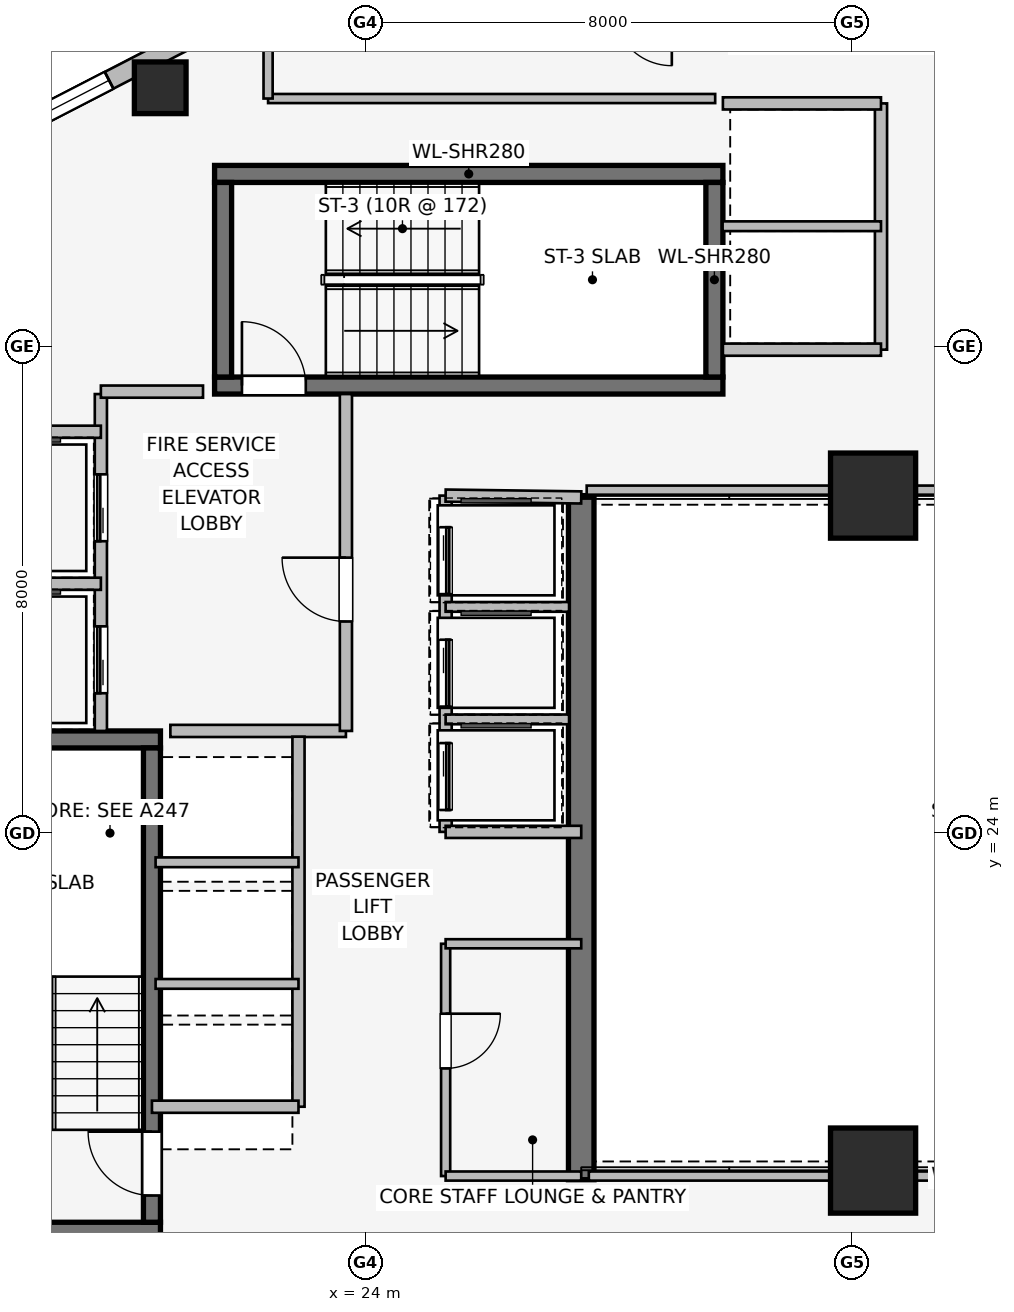
"""IFC4 building model, lengths in metres.
Left out: names, types, materials, properties, quantities, classifications, styles, units other than length and angle.
Written with IfcOpenShell. Run it as: python <this file> out.ifc"""

import sys

from ifc_helpers import new_model, si_unit, direction, frame, frame_2d, origin, origin_2d, place, context, subcontext, project, spatial, rectangle, extrude, element, fill, save


model = new_model("IFC4")
c1 = context("Model", 3, precision=1e-05, world=origin(), true_north=direction((0.0, 1.0)))
c2 = subcontext(c1, "Body", "Model", "MODEL_VIEW")
j1 = project(units=[si_unit("LENGTHUNIT", "METRE"), si_unit("PLANEANGLEUNIT", "RADIAN")], contexts=[c1])
p1 = place(None, origin())
s1 = spatial("IfcSite", under=j1, at=p1, CompositionType="ELEMENT")
p2 = place(p1, origin())
s2 = spatial("IfcBuilding", under=s1, at=p2, CompositionType="ELEMENT")
p3 = place(p2, frame((0.0, 0.0, 167.1)))
s3 = spatial("IfcBuildingStorey", under=s2, at=p3, CompositionType="ELEMENT", Elevation=167.1)
p4 = place(p3, frame((27.55, 29.55, 0.0), z_axis=(0.0, 0.0, 1.0), x_axis=(0.0, -1.0, 0.0)))
e1 = element("IfcWall", 1, at=p4, inside=s3, PredefinedType="SHEAR", context=c2, shape_type="SweptSolid", body=[
    extrude(rectangle(XDim=11.25, YDim=0.42, at=frame_2d((5.625, 0.0))), origin(), (0.0, 0.0, 1.0), 3.45),
])
for number, where, z_axis, x_axis in (
    (2, (16.87, 17.46, 0.0), (0.0, 0.0, 1.0), (1.0, 0.0, 0.0)),
    (3, (20.63, 25.54, 0.0), (0.0, 0.0, 1.0), (-1.0, 0.0, 0.0)),
):
    element("IfcWall", number, at=place(p3, frame(where, z_axis=z_axis, x_axis=x_axis)), inside=s3, PredefinedType="SHEAR", context=c2, shape_type="SweptSolid", body=[
        extrude(rectangle(XDim=3.76, YDim=0.28, at=frame_2d((1.88, 0.0))), origin(), (0.0, 0.0, 1.0), 3.45),
    ])
p5 = place(p3, frame((20.49, 17.6, 0.0), z_axis=(0.0, 0.0, 1.0), x_axis=(0.0, 1.0, 0.0)))
e4 = element("IfcWall", 4, at=p5, inside=s3, PredefinedType="SHEAR", context=c2, shape_type="SweptSolid", body=[
    extrude(rectangle(XDim=7.8, YDim=0.28, at=frame_2d((3.9, 0.0))), origin(), (0.0, 0.0, 1.0), 3.45),
])
p6 = place(p5, frame((0.44, 0.0, 0.0)))
e5 = element("IfcOpeningElement", 5, at=p6, cuts=e4, PredefinedType="OPENING", context=c2, shape_type="SweptSolid", body=[
    extrude(rectangle(XDim=1.05, YDim=2.0, at=frame_2d((0.525, 1.0))), frame((0.0, 0.15, 0.0), z_axis=(0.0, -1.0, 0.0), x_axis=(1.0, 0.0, 0.0)), (0.0, 0.0, 1.0), 0.3),
])
p7 = place(p3, frame((21.52, 31.36, 0.0), z_axis=(0.0, 0.0, 1.0), x_axis=(1.0, 0.0, 0.0)))
e6 = element("IfcWall", 6, at=p7, inside=s3, PredefinedType="SHEAR", context=c2, shape_type="SweptSolid", body=[
    extrude(rectangle(XDim=8.36, YDim=0.28, at=frame_2d((4.18, 0.0))), origin(), (0.0, 0.0, 1.0), 3.45),
])
p8 = place(p7, frame((0.45, 0.0, 0.0)))
e7 = element("IfcOpeningElement", 7, at=p8, cuts=e6, PredefinedType="OPENING", context=c2, shape_type="SweptSolid", body=[
    extrude(rectangle(XDim=1.05, YDim=2.0, at=frame_2d((0.525, 1.0))), frame((0.0, 0.15, 0.0), z_axis=(0.0, -1.0, 0.0), x_axis=(1.0, 0.0, 0.0)), (0.0, 0.0, 1.0), 0.3),
])
p9 = place(p3, frame((29.88, 34.84, 0.0), z_axis=(0.0, 0.0, 1.0), x_axis=(-1.0, 0.0, 0.0)))
e8 = element("IfcWall", 8, at=p9, inside=s3, PredefinedType="SHEAR", context=c2, shape_type="SweptSolid", body=[
    extrude(rectangle(XDim=8.36, YDim=0.28, at=frame_2d((4.18, 0.0))), origin(), (0.0, 0.0, 1.0), 3.45),
])
for number, where, z_axis, x_axis in (
    (9, (21.66, 34.7, 0.0), (0.0, 0.0, 1.0), (0.0, -1.0, 0.0)),
    (10, (29.74, 31.5, 0.0), (0.0, 0.0, 1.0), (0.0, 1.0, 0.0)),
):
    element("IfcWall", number, at=place(p3, frame(where, z_axis=z_axis, x_axis=x_axis)), inside=s3, PredefinedType="SHEAR", context=c2, shape_type="SweptSolid", body=[
        extrude(rectangle(XDim=3.2, YDim=0.28, at=frame_2d((1.6, 0.0))), origin(), (0.0, 0.0, 1.0), 3.45),
    ])
for number, where, z_axis, x_axis in (
    (11, (32.35, 18.45, 0.0), (0.0, 0.0, 1.0), (1.0, 0.0, 0.0)),
    (12, (32.35, 29.55, 0.0), (0.0, 0.0, 1.0), (1.0, 0.0, 0.0)),
):
    element("IfcColumn", number, at=place(p3, frame(where, z_axis=z_axis, x_axis=x_axis)), inside=s3, PredefinedType="COLUMN", context=c2, shape_type="SweptSolid", body=[
        extrude(rectangle(XDim=1.4, YDim=1.4, at=origin_2d()), origin(), (0.0, 0.0, 1.0), 3.45),
    ])
p10 = place(p3, frame((20.626, 36.257, 0.0), z_axis=(0.0, 0.0, 1.0), x_axis=(1.0, 0.0, 0.0)))
e13 = element("IfcColumn", 13, at=p10, inside=s3, PredefinedType="COLUMN", context=c2, shape_type="SweptSolid", body=[
    extrude(rectangle(XDim=0.85, YDim=0.85, at=origin_2d()), origin(), (0.0, 0.0, 1.0), 3.45),
])
p11 = place(p3, frame((17.408, 35.153, 0.0), z_axis=(0.0, 0.0, 1.0), x_axis=(0.888626188278, 0.458632202867, 0.0)))
e14 = element("IfcWall", 14, at=p11, inside=s3, PredefinedType="STANDARD", context=c2, shape_type="SweptSolid", body=[
    extrude(rectangle(XDim=16.828, YDim=0.31, at=frame_2d((8.414, 0.0))), origin(), (0.0, 0.0, 1.0), 3.19),
])
p12 = place(p11, frame((0.675, 0.0, 0.75)))
e15 = element("IfcOpeningElement", 15, at=p12, cuts=e14, PredefinedType="OPENING", context=c2, shape_type="SweptSolid", body=[
    extrude(rectangle(XDim=2.0, YDim=1.5, at=frame_2d((1.0, 0.75))), frame((0.0, 0.165, 0.0), z_axis=(0.0, -1.0, 0.0), x_axis=(1.0, 0.0, 0.0)), (0.0, 0.0, 1.0), 0.33),
])
p13 = place(p11, frame((6.312, 0.0, 0.75)))
e16 = element("IfcOpeningElement", 16, at=p13, cuts=e14, PredefinedType="OPENING", context=c2, shape_type="SweptSolid", body=[
    extrude(rectangle(XDim=1.35, YDim=1.45, at=frame_2d((0.675, 0.725))), frame((0.0, 0.165, 0.0), z_axis=(0.0, -1.0, 0.0), x_axis=(1.0, 0.0, 0.0)), (0.0, 0.0, 1.0), 0.33),
])
p14 = place(p11, frame((8.676, 0.0, 0.75)))
e17 = element("IfcOpeningElement", 17, at=p14, cuts=e14, PredefinedType="OPENING", context=c2, shape_type="SweptSolid", body=[
    extrude(rectangle(XDim=1.35, YDim=1.45, at=frame_2d((0.675, 0.725))), frame((0.0, 0.165, 0.0), z_axis=(0.0, -1.0, 0.0), x_axis=(1.0, 0.0, 0.0)), (0.0, 0.0, 1.0), 0.33),
])
p15 = place(p11, frame((11.041, 0.0, 0.75)))
e18 = element("IfcOpeningElement", 18, at=p15, cuts=e14, PredefinedType="OPENING", context=c2, shape_type="SweptSolid", body=[
    extrude(rectangle(XDim=1.35, YDim=1.45, at=frame_2d((0.675, 0.725))), frame((0.0, 0.165, 0.0), z_axis=(0.0, -1.0, 0.0), x_axis=(1.0, 0.0, 0.0)), (0.0, 0.0, 1.0), 0.33),
])
p16 = place(p11, frame((14.153, 0.0, 0.75)))
e19 = element("IfcOpeningElement", 19, at=p16, cuts=e14, PredefinedType="OPENING", context=c2, shape_type="SweptSolid", body=[
    extrude(rectangle(XDim=2.0, YDim=1.5, at=frame_2d((1.0, 0.75))), frame((0.0, 0.165, 0.0), z_axis=(0.0, -1.0, 0.0), x_axis=(1.0, 0.0, 0.0)), (0.0, 0.0, 1.0), 0.33),
])
p17 = place(p3, frame((19.65, 25.68, 0.0), z_axis=(0.0, 0.0, 1.0), x_axis=(0.0, 1.0, 0.0)))
e20 = element("IfcWall", 20, at=p17, inside=s3, PredefinedType="PARTITIONING", context=c2, shape_type="SweptSolid", body=[
    extrude(rectangle(XDim=5.54, YDim=0.2, at=frame_2d((2.77, 0.0))), origin(), (0.0, 0.0, 1.0), 3.19),
])
p18 = place(p17, frame((0.62, 0.0, 0.0)))
e21 = element("IfcOpeningElement", 21, at=p18, cuts=e20, PredefinedType="OPENING", context=c2, shape_type="SweptSolid", body=[
    extrude(rectangle(XDim=1.1, YDim=2.2, at=frame_2d((0.55, 1.1))), frame((0.0, 0.11, 0.0), z_axis=(0.0, -1.0, 0.0), x_axis=(1.0, 0.0, 0.0)), (0.0, 0.0, 1.0), 0.22),
])
p19 = place(p17, frame((3.12, 0.0, 0.0)))
e22 = element("IfcOpeningElement", 22, at=p19, cuts=e20, PredefinedType="OPENING", context=c2, shape_type="SweptSolid", body=[
    extrude(rectangle(XDim=1.1, YDim=2.2, at=frame_2d((0.55, 1.1))), frame((0.0, 0.11, 0.0), z_axis=(0.0, -1.0, 0.0), x_axis=(1.0, 0.0, 0.0)), (0.0, 0.0, 1.0), 0.22),
])
p20 = place(p3, frame((20.793, 25.68, 0.0), z_axis=(0.0, 0.0, 1.0), x_axis=(1.0, 0.0, 0.0)))
e23 = element("IfcWall", 23, at=p20, inside=s3, PredefinedType="PARTITIONING", context=c2, shape_type="SweptSolid", body=[
    extrude(rectangle(XDim=2.887, YDim=0.2, at=frame_2d((1.443, 0.0))), origin(), (0.0, 0.0, 1.0), 3.19),
])
p21 = place(p3, frame((23.68, 25.68, 0.0), z_axis=(0.0, 0.0, 1.0), x_axis=(0.0, 1.0, 0.0)))
e24 = element("IfcWall", 24, at=p21, inside=s3, PredefinedType="PARTITIONING", context=c2, shape_type="SweptSolid", body=[
    extrude(rectangle(XDim=5.54, YDim=0.2, at=frame_2d((2.77, 0.0))), origin(), (0.0, 0.0, 1.0), 3.19),
])
p22 = place(p21, frame((1.8, 0.0, 0.0)))
e25 = element("IfcOpeningElement", 25, at=p22, cuts=e24, PredefinedType="OPENING", context=c2, shape_type="SweptSolid", body=[
    extrude(rectangle(XDim=1.05, YDim=2.0, at=frame_2d((0.525, 1.0))), frame((0.0, 0.11, 0.0), z_axis=(0.0, -1.0, 0.0), x_axis=(1.0, 0.0, 0.0)), (0.0, 0.0, 1.0), 0.22),
])
p23 = place(p3, frame((21.33, 31.26, 0.0), z_axis=(0.0, 0.0, 1.0), x_axis=(-1.0, 0.0, 0.0)))
e26 = element("IfcWall", 26, at=p23, inside=s3, PredefinedType="PARTITIONING", context=c2, shape_type="SweptSolid", body=[
    extrude(rectangle(XDim=1.68, YDim=0.2, at=frame_2d((0.84, 0.0))), origin(), (0.0, 0.0, 1.0), 3.19),
])
p24 = place(p3, frame((17.15, 28.1, 0.0), z_axis=(0.0, 0.0, 1.0), x_axis=(1.0, 0.0, 0.0)))
e27 = element("IfcWall", 27, at=p24, inside=s3, PredefinedType="PARTITIONING", context=c2, shape_type="SweptSolid", body=[
    extrude(rectangle(XDim=2.5, YDim=0.2, at=frame_2d((1.25, 0.0))), origin(), (0.0, 0.0, 1.0), 3.19),
])
p25 = place(p3, frame((19.65, 30.6, 0.0), z_axis=(0.0, 0.0, 1.0), x_axis=(-1.0, 0.0, 0.0)))
e28 = element("IfcWall", 28, at=p25, inside=s3, PredefinedType="PARTITIONING", context=c2, shape_type="SweptSolid", body=[
    extrude(rectangle(XDim=2.5, YDim=0.2, at=frame_2d((1.25, 0.0))), origin(), (0.0, 0.0, 1.0), 2.09),
])
p26 = place(p3, frame((32.48, 31.95, 0.0), z_axis=(0.0, 0.0, 1.0), x_axis=(0.0, 1.0, 0.0)))
e29 = element("IfcWall", 29, at=p26, inside=s3, PredefinedType="PARTITIONING", context=c2, shape_type="SweptSolid", body=[
    extrude(rectangle(XDim=4.05, YDim=0.2, at=frame_2d((2.025, 0.0))), origin(), (0.0, 0.0, 1.0), 3.19),
])
for number, where, z_axis, x_axis in (
    (30, (29.88, 36.0, 0.0), (0.0, 0.0, 1.0), (1.0, 0.0, 0.0)),
    (31, (32.48, 31.95, 0.0), (0.0, 0.0, 1.0), (-1.0, 0.0, 0.0)),
):
    element("IfcWall", number, at=place(p3, frame(where, z_axis=z_axis, x_axis=x_axis)), inside=s3, PredefinedType="PARTITIONING", context=c2, shape_type="SweptSolid", body=[
        extrude(rectangle(XDim=2.6, YDim=0.2, at=frame_2d((1.3, 0.0))), origin(), (0.0, 0.0, 1.0), 3.19),
    ])
p27 = place(p3, frame((29.875, 33.98, 0.0), z_axis=(0.0, 0.0, 1.0), x_axis=(1.0, 0.0, 0.0)))
e32 = element("IfcWall", 32, at=p27, inside=s3, PredefinedType="PARTITIONING", context=c2, shape_type="SweptSolid", body=[
    extrude(rectangle(XDim=2.605, YDim=0.16, at=frame_2d((1.302, 0.0))), origin(), (0.0, 0.0, 1.0), 2.582),
])
p28 = place(p3, frame((22.9, 19.5, 0.0), z_axis=(0.0, 0.0, 1.0), x_axis=(0.0, 1.0, 0.0)))
e33 = element("IfcWall", 33, at=p28, inside=s3, PredefinedType="PARTITIONING", context=c2, shape_type="SweptSolid", body=[
    extrude(rectangle(XDim=6.085, YDim=0.2, at=frame_2d((3.042, 0.0))), origin(), (0.0, 0.0, 1.0), 3.19),
])
p29 = place(p3, frame((20.49, 19.5, 0.0), z_axis=(0.0, 0.0, 1.0), x_axis=(1.0, 0.0, 0.0)))
e34 = element("IfcWall", 34, at=p29, inside=s3, PredefinedType="PARTITIONING", context=c2, shape_type="SweptSolid", body=[
    extrude(rectangle(XDim=2.41, YDim=0.2, at=frame_2d((1.205, 0.0))), origin(), (0.0, 0.0, 1.0), 2.09),
])
for number, where, z_axis, x_axis in (
    (35, (20.55, 21.52, 0.0), (0.0, 0.0, 1.0), (1.0, 0.0, 0.0)),
    (36, (20.55, 23.52, 0.0), (0.0, 0.0, 1.0), (1.0, 0.0, 0.0)),
):
    element("IfcWall", number, at=place(p3, frame(where, z_axis=z_axis, x_axis=x_axis)), inside=s3, PredefinedType="PARTITIONING", context=c2, shape_type="SweptSolid", body=[
        extrude(rectangle(XDim=2.35, YDim=0.16, at=frame_2d((1.175, 0.0))), origin(), (0.0, 0.0, 1.0), 3.19),
    ])
p30 = place(p3, frame((25.32, 29.55, 0.0), z_axis=(0.0, 0.0, 1.0), x_axis=(0.0, -1.0, 0.0)))
e37 = element("IfcWall", 37, at=p30, inside=s3, PredefinedType="PARTITIONING", context=c2, shape_type="SweptSolid", body=[
    extrude(rectangle(XDim=5.53, YDim=0.2, at=frame_2d((2.765, 0.0))), origin(), (0.0, 0.0, 1.0), 3.19),
])
p31 = place(p30, frame((0.52, 0.0, 0.0)))
e38 = element("IfcOpeningElement", 38, at=p31, cuts=e37, PredefinedType="OPENING", context=c2, shape_type="SweptSolid", body=[
    extrude(rectangle(XDim=1.1, YDim=2.2, at=frame_2d((0.55, 1.1))), frame((0.0, 0.11, 0.0), z_axis=(0.0, -1.0, 0.0), x_axis=(1.0, 0.0, 0.0)), (0.0, 0.0, 1.0), 0.22),
])
p32 = place(p30, frame((2.37, 0.0, 0.0)))
e39 = element("IfcOpeningElement", 39, at=p32, cuts=e37, PredefinedType="OPENING", context=c2, shape_type="SweptSolid", body=[
    extrude(rectangle(XDim=1.1, YDim=2.2, at=frame_2d((0.55, 1.1))), frame((0.0, 0.11, 0.0), z_axis=(0.0, -1.0, 0.0), x_axis=(1.0, 0.0, 0.0)), (0.0, 0.0, 1.0), 0.22),
])
p33 = place(p30, frame((4.07, 0.0, 0.0)))
e40 = element("IfcOpeningElement", 40, at=p33, cuts=e37, PredefinedType="OPENING", context=c2, shape_type="SweptSolid", body=[
    extrude(rectangle(XDim=1.1, YDim=2.2, at=frame_2d((0.55, 1.1))), frame((0.0, 0.11, 0.0), z_axis=(0.0, -1.0, 0.0), x_axis=(1.0, 0.0, 0.0)), (0.0, 0.0, 1.0), 0.22),
])
p34 = place(p3, frame((27.55, 29.52, 0.0), z_axis=(0.0, 0.0, 1.0), x_axis=(-0.999909343457, 0.013464949556, 0.0)))
e41 = element("IfcWall", 41, at=p34, inside=s3, PredefinedType="PARTITIONING", context=c2, shape_type="SweptSolid", body=[
    extrude(rectangle(XDim=2.23, YDim=0.2, at=frame_2d((1.115, 0.0))), origin(), (0.0, 0.0, 1.0), 2.09),
])
p35 = place(p3, frame((25.32, 24.02, 0.0), z_axis=(0.0, 0.0, 1.0), x_axis=(1.0, 0.0, 0.0)))
e42 = element("IfcWall", 42, at=p35, inside=s3, PredefinedType="PARTITIONING", context=c2, shape_type="SweptSolid", body=[
    extrude(rectangle(XDim=2.23, YDim=0.2, at=frame_2d((1.115, 0.0))), origin(), (0.0, 0.0, 1.0), 3.19),
])
for number, where, z_axis, x_axis in (
    (43, (25.32, 25.87, 0.0), (0.0, 0.0, 1.0), (1.0, 0.0, 0.0)),
    (44, (25.32, 27.72, 0.0), (0.0, 0.0, 1.0), (1.0, 0.0, 0.0)),
):
    element("IfcWall", number, at=place(p3, frame(where, z_axis=z_axis, x_axis=x_axis)), inside=s3, PredefinedType="PARTITIONING", context=c2, shape_type="SweptSolid", body=[
        extrude(rectangle(XDim=2.03, YDim=0.16, at=frame_2d((1.015, 0.0))), origin(), (0.0, 0.0, 1.0), 3.19),
    ])
p36 = place(p3, frame((25.32, 22.18, 0.0), z_axis=(0.0, 0.0, 1.0), x_axis=(0.0, -1.0, 0.0)))
e45 = element("IfcWall", 45, at=p36, inside=s3, PredefinedType="PARTITIONING", context=c2, shape_type="SweptSolid", body=[
    extrude(rectangle(XDim=3.82, YDim=0.15, at=frame_2d((1.91, 0.0))), origin(), (0.0, 0.0, 1.0), 3.19),
])
p37 = place(p36, frame((1.15, 0.0, 0.0)))
e46 = element("IfcOpeningElement", 46, at=p37, cuts=e45, PredefinedType="OPENING", context=c2, shape_type="SweptSolid", body=[
    extrude(rectangle(XDim=0.9, YDim=2.0, at=frame_2d((0.45, 1.0))), frame((0.0, 0.085, 0.0), z_axis=(0.0, -1.0, 0.0), x_axis=(1.0, 0.0, 0.0)), (0.0, 0.0, 1.0), 0.17),
])
for number, where, z_axis, x_axis in (
    (47, (25.32, 22.18, 0.0), (0.0, 0.0, 1.0), (1.0, 0.0, 0.0)),
    (48, (25.32, 18.36, 0.0), (0.0, 0.0, 1.0), (1.0, 0.0, 0.0)),
):
    element("IfcWall", number, at=place(p3, frame(where, z_axis=z_axis, x_axis=x_axis)), inside=s3, PredefinedType="PARTITIONING", context=c2, shape_type="SweptSolid", body=[
        extrude(rectangle(XDim=2.23, YDim=0.15, at=frame_2d((1.115, 0.0))), origin(), (0.0, 0.0, 1.0), 3.19),
    ])
p38 = place(p3, frame((27.675, 18.36, 0.0), z_axis=(0.0, 0.0, 1.0), x_axis=(1.0, 0.0, 0.0)))
e49 = element("IfcWall", 49, at=p38, inside=s3, PredefinedType="PARTITIONING", context=c2, shape_type="SweptSolid", body=[
    extrude(rectangle(XDim=12.165, YDim=0.15, at=frame_2d((6.083, 0.0))), origin(), (0.0, 0.0, 1.0), 2.331),
])
p39 = place(p3, frame((39.84, 29.64, 0.0), z_axis=(0.0, 0.0, 1.0), x_axis=(-1.0, 0.0, 0.0)))
e50 = element("IfcWall", 50, at=p39, inside=s3, PredefinedType="PARTITIONING", context=c2, shape_type="SweptSolid", body=[
    extrude(rectangle(XDim=12.2, YDim=0.15, at=frame_2d((6.1, 0.0))), origin(), (0.0, 0.0, 1.0), 2.331),
])
p40 = place(p3, frame((29.753, 36.08, 0.0), z_axis=(0.0, 0.0, 1.0), x_axis=(-1.0, 0.0, 0.0)))
e51 = element("IfcWall", 51, at=p40, inside=s3, PredefinedType="PARTITIONING", context=c2, shape_type="SweptSolid", body=[
    extrude(rectangle(XDim=7.353, YDim=0.15, at=frame_2d((3.677, 0.0))), origin(), (0.0, 0.0, 1.0), 3.19),
])
p41 = place(p3, frame((22.4, 36.08, 0.0), z_axis=(0.0, 0.0, 1.0), x_axis=(0.0, 1.0, 0.0)))
e52 = element("IfcWall", 52, at=p41, inside=s3, PredefinedType="PARTITIONING", context=c2, shape_type="SweptSolid", body=[
    extrude(rectangle(XDim=1.43, YDim=0.15, at=frame_2d((0.715, 0.0))), origin(), (0.0, 0.0, 1.0), 3.19),
])
p42 = place(p12, origin())
e53 = element("IfcWindow", 53, at=p42, inside=s3, PartitioningType="SINGLE_PANEL", PredefinedType="WINDOW", context=c2, shape_type="SweptSolid", body=[
    extrude(rectangle(XDim=2.0, YDim=1.5, at=frame_2d((1.0, 0.75))), frame((0.0, 0.03, 0.0), z_axis=(0.0, -1.0, 0.0), x_axis=(1.0, 0.0, 0.0)), (0.0, 0.0, 1.0), 0.06),
])
fill(e15, e53)
p43 = place(p6, origin())
e54 = element("IfcDoor", 54, at=p43, inside=s3, OperationType="SINGLE_SWING_RIGHT", PredefinedType="DOOR", context=c2, shape_type="SweptSolid", body=[
    extrude(rectangle(XDim=1.05, YDim=2.0, at=frame_2d((0.525, 1.0))), frame((0.0, 0.025, 0.0), z_axis=(0.0, -1.0, 0.0), x_axis=(1.0, 0.0, 0.0)), (0.0, 0.0, 1.0), 0.05),
])
fill(e5, e54)
p44 = place(p8, origin())
e55 = element("IfcDoor", 55, at=p44, inside=s3, OperationType="SINGLE_SWING_LEFT", PredefinedType="DOOR", context=c2, shape_type="SweptSolid", body=[
    extrude(rectangle(XDim=1.05, YDim=2.0, at=frame_2d((0.525, 1.0))), frame((0.0, 0.025, 0.0), z_axis=(0.0, -1.0, 0.0), x_axis=(1.0, 0.0, 0.0)), (0.0, 0.0, 1.0), 0.05),
])
fill(e7, e55)
p45 = place(p18, origin())
e56 = element("IfcDoor", 56, at=p45, inside=s3, OperationType="SLIDING_TO_LEFT", PredefinedType="DOOR", context=c2, shape_type="SweptSolid", body=[
    extrude(rectangle(XDim=1.1, YDim=2.2, at=frame_2d((0.55, 1.1))), frame((0.0, 0.025, 0.0), z_axis=(0.0, -1.0, 0.0), x_axis=(1.0, 0.0, 0.0)), (0.0, 0.0, 1.0), 0.05),
])
fill(e21, e56)
p46 = place(p19, origin())
e57 = element("IfcDoor", 57, at=p46, inside=s3, OperationType="SLIDING_TO_LEFT", PredefinedType="DOOR", context=c2, shape_type="SweptSolid", body=[
    extrude(rectangle(XDim=1.1, YDim=2.2, at=frame_2d((0.55, 1.1))), frame((0.0, 0.025, 0.0), z_axis=(0.0, -1.0, 0.0), x_axis=(1.0, 0.0, 0.0)), (0.0, 0.0, 1.0), 0.05),
])
fill(e22, e57)
p47 = place(p22, origin())
e58 = element("IfcDoor", 58, at=p47, inside=s3, OperationType="SINGLE_SWING_RIGHT", PredefinedType="DOOR", context=c2, shape_type="SweptSolid", body=[
    extrude(rectangle(XDim=1.05, YDim=2.0, at=frame_2d((0.525, 1.0))), frame((0.0, 0.025, 0.0), z_axis=(0.0, -1.0, 0.0), x_axis=(1.0, 0.0, 0.0)), (0.0, 0.0, 1.0), 0.05),
])
fill(e25, e58)
p48 = place(p31, origin())
e59 = element("IfcDoor", 59, at=p48, inside=s3, OperationType="SLIDING_TO_LEFT", PredefinedType="DOOR", context=c2, shape_type="SweptSolid", body=[
    extrude(rectangle(XDim=1.1, YDim=2.2, at=frame_2d((0.55, 1.1))), frame((0.0, 0.025, 0.0), z_axis=(0.0, -1.0, 0.0), x_axis=(1.0, 0.0, 0.0)), (0.0, 0.0, 1.0), 0.05),
])
fill(e38, e59)
p49 = place(p32, origin())
e60 = element("IfcDoor", 60, at=p49, inside=s3, OperationType="SLIDING_TO_LEFT", PredefinedType="DOOR", context=c2, shape_type="SweptSolid", body=[
    extrude(rectangle(XDim=1.1, YDim=2.2, at=frame_2d((0.55, 1.1))), frame((0.0, 0.025, 0.0), z_axis=(0.0, -1.0, 0.0), x_axis=(1.0, 0.0, 0.0)), (0.0, 0.0, 1.0), 0.05),
])
fill(e39, e60)
p50 = place(p33, origin())
e61 = element("IfcDoor", 61, at=p50, inside=s3, OperationType="SLIDING_TO_LEFT", PredefinedType="DOOR", context=c2, shape_type="SweptSolid", body=[
    extrude(rectangle(XDim=1.1, YDim=2.2, at=frame_2d((0.55, 1.1))), frame((0.0, 0.025, 0.0), z_axis=(0.0, -1.0, 0.0), x_axis=(1.0, 0.0, 0.0)), (0.0, 0.0, 1.0), 0.05),
])
fill(e40, e61)
p51 = place(p37, origin())
e62 = element("IfcDoor", 62, at=p51, inside=s3, OperationType="SINGLE_SWING_LEFT", PredefinedType="DOOR", context=c2, shape_type="SweptSolid", body=[
    extrude(rectangle(XDim=0.9, YDim=2.0, at=frame_2d((0.45, 1.0))), frame((0.0, 0.025, 0.0), z_axis=(0.0, -1.0, 0.0), x_axis=(1.0, 0.0, 0.0)), (0.0, 0.0, 1.0), 0.05),
])
fill(e46, e62)
save(model, sys.argv[1])
